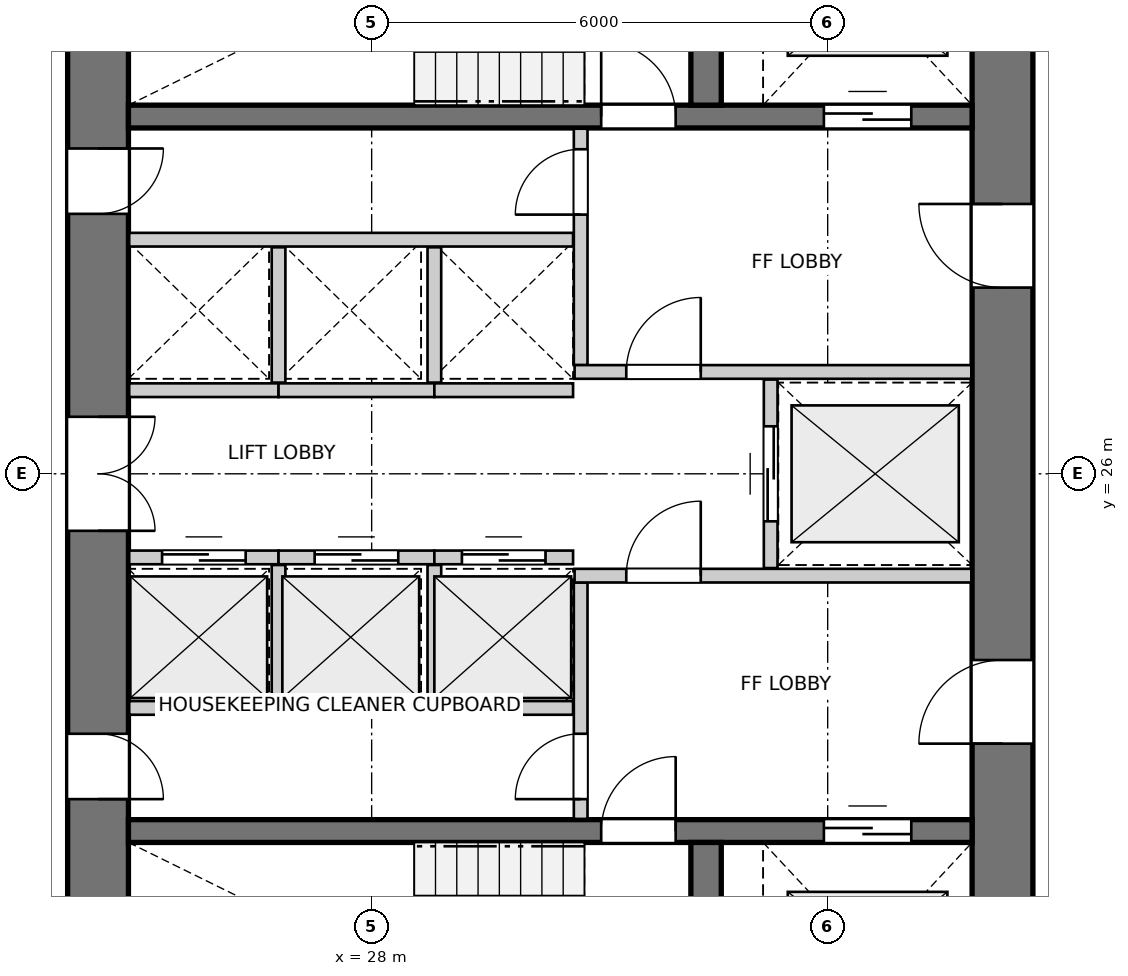
"""IFC4 building model, lengths in metres.
Left out: names, types, materials, properties, quantities, classifications, styles, units other than length and angle.
Written with IfcOpenShell. Run it as: python <this file> out.ifc"""

import sys

from ifc_helpers import new_model, si_unit, direction, frame, frame_2d, origin, place, context, subcontext, project, spatial, rectangle, extrude, source, transform, mapped, element, fill, save


model = new_model("IFC4")
c1 = context("Model", 3, precision=1e-05, world=origin(), true_north=direction((0.0, 1.0)))
c2 = subcontext(c1, "Body", "Model", "MODEL_VIEW")
j1 = project(units=[si_unit("LENGTHUNIT", "METRE"), si_unit("PLANEANGLEUNIT", "RADIAN")], contexts=[c1])
p1 = place(None, origin())
s1 = spatial("IfcSite", under=j1, at=p1, CompositionType="ELEMENT")
p2 = place(p1, origin())
s2 = spatial("IfcBuilding", under=s1, at=p2, CompositionType="ELEMENT")
p3 = place(p2, frame((0.0, 0.0, 39.8)))
s3 = spatial("IfcBuildingStorey", under=s2, at=p3, CompositionType="ELEMENT", Elevation=39.8)
p4 = place(p3, frame((24.4, 33.8, 0.0), z_axis=(0.0, 0.0, 1.0), x_axis=(0.0, -1.0, 0.0)))
e1 = element("IfcWall", 1, at=p4, inside=s3, PredefinedType="SHEAR", context=c2, shape_type="SweptSolid", body=[
    extrude(rectangle(XDim=15.6, YDim=0.8, at=frame_2d((7.8, 0.0))), origin(), (0.0, 0.0, 1.0), 2.94),
])
p5 = place(p4, frame((7.05, 0.0, 0.0)))
e2 = element("IfcOpeningElement", 2, at=p5, cuts=e1, PredefinedType="OPENING", context=c2, shape_type="SweptSolid", body=[
    extrude(rectangle(XDim=1.5, YDim=2.15, at=frame_2d((0.75, 1.075))), frame((0.0, 0.41, 0.0), z_axis=(0.0, -1.0, 0.0), x_axis=(1.0, 0.0, 0.0)), (0.0, 0.0, 1.0), 0.82),
])
p6 = place(p4, frame((3.52, 0.0, 0.0)))
e3 = element("IfcOpeningElement", 3, at=p6, cuts=e1, PredefinedType="OPENING", context=c2, shape_type="SweptSolid", body=[
    extrude(rectangle(XDim=0.86, YDim=2.05, at=frame_2d((0.43, 1.025))), frame((0.0, 0.41, 0.0), z_axis=(0.0, -1.0, 0.0), x_axis=(1.0, 0.0, 0.0)), (0.0, 0.0, 1.0), 0.82),
])
p7 = place(p4, frame((11.22, 0.0, 0.0)))
e4 = element("IfcOpeningElement", 4, at=p7, cuts=e1, PredefinedType="OPENING", context=c2, shape_type="SweptSolid", body=[
    extrude(rectangle(XDim=0.86, YDim=2.05, at=frame_2d((0.43, 1.025))), frame((0.0, 0.41, 0.0), z_axis=(0.0, -1.0, 0.0), x_axis=(1.0, 0.0, 0.0)), (0.0, 0.0, 1.0), 0.82),
])
p8 = place(p3, frame((36.3, 18.2, 0.0), z_axis=(0.0, 0.0, 1.0), x_axis=(0.0, 1.0, 0.0)))
e5 = element("IfcWall", 5, at=p8, inside=s3, PredefinedType="SHEAR", context=c2, shape_type="SweptSolid", body=[
    extrude(rectangle(XDim=15.6, YDim=0.8, at=frame_2d((7.8, 0.0))), origin(), (0.0, 0.0, 1.0), 2.94),
])
p9 = place(p8, frame((4.25, 0.0, 0.0)))
e6 = element("IfcOpeningElement", 6, at=p9, cuts=e5, PredefinedType="OPENING", context=c2, shape_type="SweptSolid", body=[
    extrude(rectangle(XDim=1.1, YDim=2.15, at=frame_2d((0.55, 1.075))), frame((0.0, 0.41, 0.0), z_axis=(0.0, -1.0, 0.0), x_axis=(1.0, 0.0, 0.0)), (0.0, 0.0, 1.0), 0.82),
])
p10 = place(p8, frame((10.25, 0.0, 0.0)))
e7 = element("IfcOpeningElement", 7, at=p10, cuts=e5, PredefinedType="OPENING", context=c2, shape_type="SweptSolid", body=[
    extrude(rectangle(XDim=1.1, YDim=2.15, at=frame_2d((0.55, 1.075))), frame((0.0, 0.41, 0.0), z_axis=(0.0, -1.0, 0.0), x_axis=(1.0, 0.0, 0.0)), (0.0, 0.0, 1.0), 0.82),
])
p11 = place(p3, frame((24.8, 21.3, 0.0), z_axis=(0.0, 0.0, 1.0), x_axis=(1.0, 0.0, 0.0)))
e8 = element("IfcWall", 8, at=p11, inside=s3, PredefinedType="SHEAR", context=c2, shape_type="SweptSolid", body=[
    extrude(rectangle(XDim=11.1, YDim=0.3, at=frame_2d((5.55, 0.0))), origin(), (0.0, 0.0, 1.0), 2.94),
])
p12 = place(p11, frame((6.22, 0.0, 0.0)))
e9 = element("IfcOpeningElement", 9, at=p12, cuts=e8, PredefinedType="OPENING", context=c2, shape_type="SweptSolid", body=[
    extrude(rectangle(XDim=0.98, YDim=2.15, at=frame_2d((0.49, 1.075))), frame((0.0, 0.16, 0.0), z_axis=(0.0, -1.0, 0.0), x_axis=(1.0, 0.0, 0.0)), (0.0, 0.0, 1.0), 0.32),
])
p13 = place(p11, frame((9.15, 0.0, 0.0)))
e10 = element("IfcOpeningElement", 10, at=p13, cuts=e8, PredefinedType="OPENING", context=c2, shape_type="SweptSolid", body=[
    extrude(rectangle(XDim=1.15, YDim=2.15, at=frame_2d((0.575, 1.075))), frame((0.0, 0.16, 0.0), z_axis=(0.0, -1.0, 0.0), x_axis=(1.0, 0.0, 0.0)), (0.0, 0.0, 1.0), 0.32),
])
p14 = place(p3, frame((32.4, 18.2, 0.0), z_axis=(0.0, 0.0, 1.0), x_axis=(0.0, 1.0, 0.0)))
e11 = element("IfcWall", 11, at=p14, inside=s3, PredefinedType="SHEAR", context=c2, shape_type="SweptSolid", body=[
    extrude(rectangle(XDim=2.95, YDim=0.4, at=frame_2d((1.475, 0.0))), origin(), (0.0, 0.0, 1.0), 2.94),
])
p15 = place(p3, frame((24.8, 30.7, 0.0), z_axis=(0.0, 0.0, 1.0), x_axis=(1.0, 0.0, 0.0)))
e12 = element("IfcWall", 12, at=p15, inside=s3, PredefinedType="SHEAR", context=c2, shape_type="SweptSolid", body=[
    extrude(rectangle(XDim=11.1, YDim=0.3, at=frame_2d((5.55, 0.0))), origin(), (0.0, 0.0, 1.0), 2.94),
])
p16 = place(p15, frame((6.22, 0.0, 0.0)))
e13 = element("IfcOpeningElement", 13, at=p16, cuts=e12, PredefinedType="OPENING", context=c2, shape_type="SweptSolid", body=[
    extrude(rectangle(XDim=0.98, YDim=2.15, at=frame_2d((0.49, 1.075))), frame((0.0, 0.16, 0.0), z_axis=(0.0, -1.0, 0.0), x_axis=(1.0, 0.0, 0.0)), (0.0, 0.0, 1.0), 0.32),
])
p17 = place(p15, frame((9.15, 0.0, 0.0)))
e14 = element("IfcOpeningElement", 14, at=p17, cuts=e12, PredefinedType="OPENING", context=c2, shape_type="SweptSolid", body=[
    extrude(rectangle(XDim=1.15, YDim=2.15, at=frame_2d((0.575, 1.075))), frame((0.0, 0.16, 0.0), z_axis=(0.0, -1.0, 0.0), x_axis=(1.0, 0.0, 0.0)), (0.0, 0.0, 1.0), 0.32),
])
p18 = place(p3, frame((32.4, 30.85, 0.0), z_axis=(0.0, 0.0, 1.0), x_axis=(0.0, 1.0, 0.0)))
e15 = element("IfcWall", 15, at=p18, inside=s3, PredefinedType="SHEAR", context=c2, shape_type="SweptSolid", body=[
    extrude(rectangle(XDim=2.95, YDim=0.4, at=frame_2d((1.475, 0.0))), origin(), (0.0, 0.0, 1.0), 2.94),
])
p19 = place(p3, frame((30.75, 21.46, 0.0), z_axis=(0.0, 0.0, 1.0), x_axis=(0.0, 1.0, 0.0)))
e16 = element("IfcWall", 16, at=p19, inside=s3, PredefinedType="PARTITIONING", context=c2, shape_type="SweptSolid", body=[
    extrude(rectangle(XDim=3.11, YDim=0.18, at=frame_2d((1.555, 0.0))), origin(), (0.0, 0.0, 1.0), 2.94),
])
p20 = place(p19, frame((0.26, 0.0, 0.0)))
e17 = element("IfcOpeningElement", 17, at=p20, cuts=e16, PredefinedType="OPENING", context=c2, shape_type="SweptSolid", body=[
    extrude(rectangle(XDim=0.86, YDim=2.05, at=frame_2d((0.43, 1.025))), frame((0.0, 0.1, 0.0), z_axis=(0.0, -1.0, 0.0), x_axis=(1.0, 0.0, 0.0)), (0.0, 0.0, 1.0), 0.2),
])
p21 = place(p3, frame((30.67, 24.66, 0.0), z_axis=(0.0, 0.0, 1.0), x_axis=(1.0, 0.0, 0.0)))
e18 = element("IfcWall", 18, at=p21, inside=s3, PredefinedType="PARTITIONING", context=c2, shape_type="SweptSolid", body=[
    extrude(rectangle(XDim=5.22, YDim=0.18, at=frame_2d((2.61, 0.0))), origin(), (0.0, 0.0, 1.0), 2.94),
])
p22 = place(p21, frame((0.68, 0.0, 0.0)))
e19 = element("IfcOpeningElement", 19, at=p22, cuts=e18, PredefinedType="OPENING", context=c2, shape_type="SweptSolid", body=[
    extrude(rectangle(XDim=0.98, YDim=2.15, at=frame_2d((0.49, 1.075))), frame((0.0, 0.1, 0.0), z_axis=(0.0, -1.0, 0.0), x_axis=(1.0, 0.0, 0.0)), (0.0, 0.0, 1.0), 0.2),
])
p23 = place(p3, frame((30.75, 27.43, 0.0), z_axis=(0.0, 0.0, 1.0), x_axis=(0.0, 1.0, 0.0)))
e20 = element("IfcWall", 20, at=p23, inside=s3, PredefinedType="PARTITIONING", context=c2, shape_type="SweptSolid", body=[
    extrude(rectangle(XDim=3.11, YDim=0.18, at=frame_2d((1.555, 0.0))), origin(), (0.0, 0.0, 1.0), 2.94),
])
p24 = place(p23, frame((1.98, 0.0, 0.0)))
e21 = element("IfcOpeningElement", 21, at=p24, cuts=e20, PredefinedType="OPENING", context=c2, shape_type="SweptSolid", body=[
    extrude(rectangle(XDim=0.86, YDim=2.05, at=frame_2d((0.43, 1.025))), frame((0.0, 0.1, 0.0), z_axis=(0.0, -1.0, 0.0), x_axis=(1.0, 0.0, 0.0)), (0.0, 0.0, 1.0), 0.2),
])
p25 = place(p3, frame((30.67, 27.34, 0.0), z_axis=(0.0, 0.0, 1.0), x_axis=(1.0, 0.0, 0.0)))
e22 = element("IfcWall", 22, at=p25, inside=s3, PredefinedType="PARTITIONING", context=c2, shape_type="SweptSolid", body=[
    extrude(rectangle(XDim=5.22, YDim=0.18, at=frame_2d((2.61, 0.0))), origin(), (0.0, 0.0, 1.0), 2.94),
])
p26 = place(p25, frame((0.68, 0.0, 0.0)))
e23 = element("IfcOpeningElement", 23, at=p26, cuts=e22, PredefinedType="OPENING", context=c2, shape_type="SweptSolid", body=[
    extrude(rectangle(XDim=0.98, YDim=2.15, at=frame_2d((0.49, 1.075))), frame((0.0, 0.1, 0.0), z_axis=(0.0, -1.0, 0.0), x_axis=(1.0, 0.0, 0.0)), (0.0, 0.0, 1.0), 0.2),
])
p27 = place(p3, frame((33.25, 24.76, 0.0), z_axis=(0.0, 0.0, 1.0), x_axis=(0.0, 1.0, 0.0)))
e24 = element("IfcWall", 24, at=p27, inside=s3, PredefinedType="PARTITIONING", context=c2, shape_type="SweptSolid", body=[
    extrude(rectangle(XDim=2.48, YDim=0.18, at=frame_2d((1.24, 0.0))), origin(), (0.0, 0.0, 1.0), 2.94),
])
p28 = place(p27, frame((0.615, 0.0, 0.0)))
e25 = element("IfcOpeningElement", 25, at=p28, cuts=e24, PredefinedType="OPENING", context=c2, shape_type="SweptSolid", body=[
    extrude(rectangle(XDim=1.25, YDim=2.15, at=frame_2d((0.625, 1.075))), frame((0.0, 0.1, 0.0), z_axis=(0.0, -1.0, 0.0), x_axis=(1.0, 0.0, 0.0)), (0.0, 0.0, 1.0), 0.2),
])
p29 = place(p3, frame((24.81, 22.92, 0.0), z_axis=(0.0, 0.0, 1.0), x_axis=(1.0, 0.0, 0.0)))
e26 = element("IfcWall", 26, at=p29, inside=s3, PredefinedType="PARTITIONING", context=c2, shape_type="SweptSolid", body=[
    extrude(rectangle(XDim=5.84, YDim=0.18, at=frame_2d((2.92, 0.0))), origin(), (0.0, 0.0, 1.0), 2.94),
])
p30 = place(p3, frame((24.81, 24.9, 0.0), z_axis=(0.0, 0.0, 1.0), x_axis=(1.0, 0.0, 0.0)))
e27 = element("IfcWall", 27, at=p30, inside=s3, PredefinedType="PARTITIONING", context=c2, shape_type="SweptSolid", body=[
    extrude(rectangle(XDim=1.965, YDim=0.18, at=frame_2d((0.982, 0.0))), origin(), (0.0, 0.0, 1.0), 2.94),
])
p31 = place(p30, frame((0.433, 0.0, 0.0)))
e28 = element("IfcOpeningElement", 28, at=p31, cuts=e27, PredefinedType="OPENING", context=c2, shape_type="SweptSolid", body=[
    extrude(rectangle(XDim=1.1, YDim=2.15, at=frame_2d((0.55, 1.075))), frame((0.0, 0.1, 0.0), z_axis=(0.0, -1.0, 0.0), x_axis=(1.0, 0.0, 0.0)), (0.0, 0.0, 1.0), 0.2),
])
p32 = place(p3, frame((26.775, 24.9, 0.0), z_axis=(0.0, 0.0, 1.0), x_axis=(1.0, 0.0, 0.0)))
e29 = element("IfcWall", 29, at=p32, inside=s3, PredefinedType="PARTITIONING", context=c2, shape_type="SweptSolid", body=[
    extrude(rectangle(XDim=2.05, YDim=0.18, at=frame_2d((1.025, 0.0))), origin(), (0.0, 0.0, 1.0), 2.94),
])
p33 = place(p32, frame((0.475, 0.0, 0.0)))
e30 = element("IfcOpeningElement", 30, at=p33, cuts=e29, PredefinedType="OPENING", context=c2, shape_type="SweptSolid", body=[
    extrude(rectangle(XDim=1.1, YDim=2.15, at=frame_2d((0.55, 1.075))), frame((0.0, 0.1, 0.0), z_axis=(0.0, -1.0, 0.0), x_axis=(1.0, 0.0, 0.0)), (0.0, 0.0, 1.0), 0.2),
])
p34 = place(p3, frame((26.775, 23.02, 0.0), z_axis=(0.0, 0.0, 1.0), x_axis=(0.0, 1.0, 0.0)))
e31 = element("IfcWall", 31, at=p34, inside=s3, PredefinedType="PARTITIONING", context=c2, shape_type="SweptSolid", body=[
    extrude(rectangle(XDim=1.78, YDim=0.18, at=frame_2d((0.89, 0.0))), origin(), (0.0, 0.0, 1.0), 2.94),
])
p35 = place(p3, frame((28.825, 24.9, 0.0), z_axis=(0.0, 0.0, 1.0), x_axis=(1.0, 0.0, 0.0)))
e32 = element("IfcWall", 32, at=p35, inside=s3, PredefinedType="PARTITIONING", context=c2, shape_type="SweptSolid", body=[
    extrude(rectangle(XDim=1.825, YDim=0.18, at=frame_2d((0.913, 0.0))), origin(), (0.0, 0.0, 1.0), 2.94),
])
p36 = place(p35, frame((0.363, 0.0, 0.0)))
e33 = element("IfcOpeningElement", 33, at=p36, cuts=e32, PredefinedType="OPENING", context=c2, shape_type="SweptSolid", body=[
    extrude(rectangle(XDim=1.1, YDim=2.15, at=frame_2d((0.55, 1.075))), frame((0.0, 0.1, 0.0), z_axis=(0.0, -1.0, 0.0), x_axis=(1.0, 0.0, 0.0)), (0.0, 0.0, 1.0), 0.2),
])
p37 = place(p3, frame((28.825, 23.02, 0.0), z_axis=(0.0, 0.0, 1.0), x_axis=(0.0, 1.0, 0.0)))
e34 = element("IfcWall", 34, at=p37, inside=s3, PredefinedType="PARTITIONING", context=c2, shape_type="SweptSolid", body=[
    extrude(rectangle(XDim=1.78, YDim=0.18, at=frame_2d((0.89, 0.0))), origin(), (0.0, 0.0, 1.0), 2.94),
])
p38 = place(p3, frame((24.81, 29.08, 0.0), z_axis=(0.0, 0.0, 1.0), x_axis=(1.0, 0.0, 0.0)))
e35 = element("IfcWall", 35, at=p38, inside=s3, PredefinedType="PARTITIONING", context=c2, shape_type="SweptSolid", body=[
    extrude(rectangle(XDim=5.84, YDim=0.18, at=frame_2d((2.92, 0.0))), origin(), (0.0, 0.0, 1.0), 2.94),
])
p39 = place(p3, frame((24.81, 27.1, 0.0), z_axis=(0.0, 0.0, 1.0), x_axis=(1.0, 0.0, 0.0)))
e36 = element("IfcWall", 36, at=p39, inside=s3, PredefinedType="PARTITIONING", context=c2, shape_type="SweptSolid", body=[
    extrude(rectangle(XDim=1.965, YDim=0.18, at=frame_2d((0.982, 0.0))), origin(), (0.0, 0.0, 1.0), 2.94),
])
p40 = place(p3, frame((26.775, 27.1, 0.0), z_axis=(0.0, 0.0, 1.0), x_axis=(1.0, 0.0, 0.0)))
e37 = element("IfcWall", 37, at=p40, inside=s3, PredefinedType="PARTITIONING", context=c2, shape_type="SweptSolid", body=[
    extrude(rectangle(XDim=2.05, YDim=0.18, at=frame_2d((1.025, 0.0))), origin(), (0.0, 0.0, 1.0), 2.94),
])
p41 = place(p3, frame((26.775, 27.2, 0.0), z_axis=(0.0, 0.0, 1.0), x_axis=(0.0, 1.0, 0.0)))
e38 = element("IfcWall", 38, at=p41, inside=s3, PredefinedType="PARTITIONING", context=c2, shape_type="SweptSolid", body=[
    extrude(rectangle(XDim=1.78, YDim=0.18, at=frame_2d((0.89, 0.0))), origin(), (0.0, 0.0, 1.0), 2.94),
])
p42 = place(p3, frame((28.825, 27.1, 0.0), z_axis=(0.0, 0.0, 1.0), x_axis=(1.0, 0.0, 0.0)))
e39 = element("IfcWall", 39, at=p42, inside=s3, PredefinedType="PARTITIONING", context=c2, shape_type="SweptSolid", body=[
    extrude(rectangle(XDim=1.825, YDim=0.18, at=frame_2d((0.913, 0.0))), origin(), (0.0, 0.0, 1.0), 2.94),
])
p43 = place(p3, frame((28.825, 27.2, 0.0), z_axis=(0.0, 0.0, 1.0), x_axis=(0.0, 1.0, 0.0)))
e40 = element("IfcWall", 40, at=p43, inside=s3, PredefinedType="PARTITIONING", context=c2, shape_type="SweptSolid", body=[
    extrude(rectangle(XDim=1.78, YDim=0.18, at=frame_2d((0.89, 0.0))), origin(), (0.0, 0.0, 1.0), 2.94),
])
m1 = source(origin(), c2, "Body", "SweptSolid", [
    extrude(rectangle(XDim=0.98, YDim=2.15, at=frame_2d((0.49, 1.075))), frame((0.0, 0.025, 0.0), z_axis=(0.0, -1.0, 0.0), x_axis=(1.0, 0.0, 0.0)), (0.0, 0.0, 1.0), 0.05),
])
p44 = place(p12, origin())
e41 = element("IfcDoor", 41, at=p44, inside=s3, OperationType="SINGLE_SWING_RIGHT", PredefinedType="DOOR", context=c2, shape_type="MappedRepresentation", body=[
    mapped(m1, transform((0.0, 0.0, 0.0), x_axis=(1.0, 0.0, 0.0), y_axis=(0.0, 1.0, 0.0), z_axis=(0.0, 0.0, 1.0), scale=1.0)),
])
fill(e9, e41)
m2 = source(origin(), c2, "Body", "SweptSolid", [
    extrude(rectangle(XDim=1.15, YDim=2.15, at=frame_2d((0.575, 1.075))), frame((0.0, 0.025, 0.0), z_axis=(0.0, -1.0, 0.0), x_axis=(1.0, 0.0, 0.0)), (0.0, 0.0, 1.0), 0.05),
])
p45 = place(p13, origin())
e42 = element("IfcDoor", 42, at=p45, inside=s3, OperationType="DOUBLE_DOOR_SLIDING", PredefinedType="DOOR", context=c2, shape_type="MappedRepresentation", body=[
    mapped(m2, transform((0.0, 0.0, 0.0), x_axis=(1.0, 0.0, 0.0), y_axis=(0.0, 1.0, 0.0), z_axis=(0.0, 0.0, 1.0), scale=1.0)),
])
fill(e10, e42)
p46 = place(p16, origin())
e43 = element("IfcDoor", 43, at=p46, inside=s3, OperationType="SINGLE_SWING_LEFT", PredefinedType="DOOR", context=c2, shape_type="MappedRepresentation", body=[
    mapped(m1, transform((0.0, 0.0, 0.0), x_axis=(1.0, 0.0, 0.0), y_axis=(0.0, 1.0, 0.0), z_axis=(0.0, 0.0, 1.0), scale=1.0)),
])
fill(e13, e43)
p47 = place(p17, origin())
e44 = element("IfcDoor", 44, at=p47, inside=s3, OperationType="DOUBLE_DOOR_SLIDING", PredefinedType="DOOR", context=c2, shape_type="MappedRepresentation", body=[
    mapped(m2, transform((0.0, 0.0, 0.0), x_axis=(1.0, 0.0, 0.0), y_axis=(0.0, 1.0, 0.0), z_axis=(0.0, 0.0, 1.0), scale=1.0)),
])
fill(e14, e44)
m3 = source(origin(), c2, "Body", "SweptSolid", [
    extrude(rectangle(XDim=1.1, YDim=2.15, at=frame_2d((0.55, 1.075))), frame((0.0, 0.025, 0.0), z_axis=(0.0, -1.0, 0.0), x_axis=(1.0, 0.0, 0.0)), (0.0, 0.0, 1.0), 0.05),
])
p48 = place(p9, origin())
e45 = element("IfcDoor", 45, at=p48, inside=s3, OperationType="SINGLE_SWING_LEFT", PredefinedType="DOOR", context=c2, shape_type="MappedRepresentation", body=[
    mapped(m3, transform((0.0, 0.0, 0.0), x_axis=(1.0, 0.0, 0.0), y_axis=(0.0, 1.0, 0.0), z_axis=(0.0, 0.0, 1.0), scale=1.0)),
])
fill(e6, e45)
p49 = place(p10, origin())
e46 = element("IfcDoor", 46, at=p49, inside=s3, OperationType="SINGLE_SWING_RIGHT", PredefinedType="DOOR", context=c2, shape_type="MappedRepresentation", body=[
    mapped(m3, transform((0.0, 0.0, 0.0), x_axis=(1.0, 0.0, 0.0), y_axis=(0.0, 1.0, 0.0), z_axis=(0.0, 0.0, 1.0), scale=1.0)),
])
fill(e7, e46)
m4 = source(origin(), c2, "Body", "SweptSolid", [
    extrude(rectangle(XDim=1.5, YDim=2.15, at=frame_2d((0.75, 1.075))), frame((0.0, 0.025, 0.0), z_axis=(0.0, -1.0, 0.0), x_axis=(1.0, 0.0, 0.0)), (0.0, 0.0, 1.0), 0.05),
])
p50 = place(p5, origin())
e47 = element("IfcDoor", 47, at=p50, inside=s3, OperationType="DOUBLE_DOOR_SINGLE_SWING", PredefinedType="DOOR", context=c2, shape_type="MappedRepresentation", body=[
    mapped(m4, transform((0.0, 0.0, 0.0), x_axis=(1.0, 0.0, 0.0), y_axis=(0.0, 1.0, 0.0), z_axis=(0.0, 0.0, 1.0), scale=1.0)),
])
fill(e2, e47)
m5 = source(origin(), c2, "Body", "SweptSolid", [
    extrude(rectangle(XDim=0.86, YDim=2.05, at=frame_2d((0.43, 1.025))), frame((0.0, 0.025, 0.0), z_axis=(0.0, -1.0, 0.0), x_axis=(1.0, 0.0, 0.0)), (0.0, 0.0, 1.0), 0.05),
])
p51 = place(p6, origin())
e48 = element("IfcDoor", 48, at=p51, inside=s3, OperationType="SINGLE_SWING_LEFT", PredefinedType="DOOR", context=c2, shape_type="MappedRepresentation", body=[
    mapped(m5, transform((0.0, 0.0, 0.0), x_axis=(1.0, 0.0, 0.0), y_axis=(0.0, 1.0, 0.0), z_axis=(0.0, 0.0, 1.0), scale=1.0)),
])
fill(e3, e48)
p52 = place(p7, origin())
e49 = element("IfcDoor", 49, at=p52, inside=s3, OperationType="SINGLE_SWING_RIGHT", PredefinedType="DOOR", context=c2, shape_type="MappedRepresentation", body=[
    mapped(m5, transform((0.0, 0.0, 0.0), x_axis=(1.0, 0.0, 0.0), y_axis=(0.0, 1.0, 0.0), z_axis=(0.0, 0.0, 1.0), scale=1.0)),
])
fill(e4, e49)
p53 = place(p20, origin())
e50 = element("IfcDoor", 50, at=p53, inside=s3, OperationType="SINGLE_SWING_LEFT", PredefinedType="DOOR", context=c2, shape_type="MappedRepresentation", body=[
    mapped(m5, transform((0.0, 0.0, 0.0), x_axis=(1.0, 0.0, 0.0), y_axis=(0.0, 1.0, 0.0), z_axis=(0.0, 0.0, 1.0), scale=1.0)),
])
fill(e17, e50)
p54 = place(p22, origin())
e51 = element("IfcDoor", 51, at=p54, inside=s3, OperationType="SINGLE_SWING_RIGHT", PredefinedType="DOOR", context=c2, shape_type="MappedRepresentation", body=[
    mapped(m1, transform((0.0, 0.0, 0.0), x_axis=(1.0, 0.0, 0.0), y_axis=(0.0, 1.0, 0.0), z_axis=(0.0, 0.0, 1.0), scale=1.0)),
])
fill(e19, e51)
p55 = place(p24, origin())
e52 = element("IfcDoor", 52, at=p55, inside=s3, OperationType="SINGLE_SWING_LEFT", PredefinedType="DOOR", context=c2, shape_type="MappedRepresentation", body=[
    mapped(m5, transform((0.0, 0.0, 0.0), x_axis=(1.0, 0.0, 0.0), y_axis=(0.0, 1.0, 0.0), z_axis=(0.0, 0.0, 1.0), scale=1.0)),
])
fill(e21, e52)
p56 = place(p26, origin())
e53 = element("IfcDoor", 53, at=p56, inside=s3, OperationType="SINGLE_SWING_RIGHT", PredefinedType="DOOR", context=c2, shape_type="MappedRepresentation", body=[
    mapped(m1, transform((0.0, 0.0, 0.0), x_axis=(1.0, 0.0, 0.0), y_axis=(0.0, 1.0, 0.0), z_axis=(0.0, 0.0, 1.0), scale=1.0)),
])
fill(e23, e53)
m6 = source(origin(), c2, "Body", "SweptSolid", [
    extrude(rectangle(XDim=1.25, YDim=2.15, at=frame_2d((0.625, 1.075))), frame((0.0, 0.025, 0.0), z_axis=(0.0, -1.0, 0.0), x_axis=(1.0, 0.0, 0.0)), (0.0, 0.0, 1.0), 0.05),
])
p57 = place(p28, origin())
e54 = element("IfcDoor", 54, at=p57, inside=s3, OperationType="DOUBLE_DOOR_SLIDING", PredefinedType="DOOR", context=c2, shape_type="MappedRepresentation", body=[
    mapped(m6, transform((0.0, 0.0, 0.0), x_axis=(1.0, 0.0, 0.0), y_axis=(0.0, 1.0, 0.0), z_axis=(0.0, 0.0, 1.0), scale=1.0)),
])
fill(e25, e54)
p58 = place(p31, origin())
e55 = element("IfcDoor", 55, at=p58, inside=s3, OperationType="DOUBLE_DOOR_SLIDING", PredefinedType="DOOR", context=c2, shape_type="MappedRepresentation", body=[
    mapped(m3, transform((0.0, 0.0, 0.0), x_axis=(1.0, 0.0, 0.0), y_axis=(0.0, 1.0, 0.0), z_axis=(0.0, 0.0, 1.0), scale=1.0)),
])
fill(e28, e55)
p59 = place(p33, origin())
e56 = element("IfcDoor", 56, at=p59, inside=s3, OperationType="DOUBLE_DOOR_SLIDING", PredefinedType="DOOR", context=c2, shape_type="MappedRepresentation", body=[
    mapped(m3, transform((0.0, 0.0, 0.0), x_axis=(1.0, 0.0, 0.0), y_axis=(0.0, 1.0, 0.0), z_axis=(0.0, 0.0, 1.0), scale=1.0)),
])
fill(e30, e56)
p60 = place(p36, origin())
e57 = element("IfcDoor", 57, at=p60, inside=s3, OperationType="DOUBLE_DOOR_SLIDING", PredefinedType="DOOR", context=c2, shape_type="MappedRepresentation", body=[
    mapped(m3, transform((0.0, 0.0, 0.0), x_axis=(1.0, 0.0, 0.0), y_axis=(0.0, 1.0, 0.0), z_axis=(0.0, 0.0, 1.0), scale=1.0)),
])
fill(e33, e57)
save(model, sys.argv[1])
